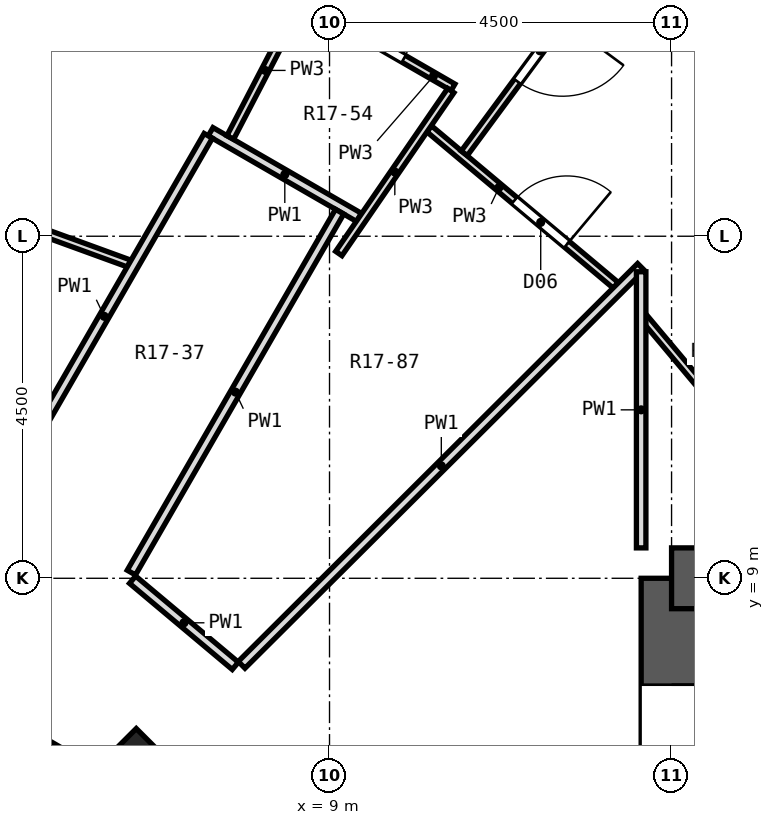
"""IFC4 building model, lengths in metres.
Left out: names, types, materials, properties, quantities, classifications, styles, units other than length and angle.
Written with IfcOpenShell. Run it as: python <this file> out.ifc"""

import sys

from ifc_helpers import new_model, si_unit, direction, frame, frame_2d, origin, origin_2d, place, context, subcontext, project, spatial, rectangle, extrude, element, fill, save


model = new_model("IFC4")
c1 = context("Model", 3, precision=1e-05, world=origin(), true_north=direction((0.0, 1.0)))
c2 = subcontext(c1, "Body", "Model", "MODEL_VIEW")
j1 = project(units=[si_unit("LENGTHUNIT", "METRE"), si_unit("PLANEANGLEUNIT", "RADIAN")], contexts=[c1])
p1 = place(None, origin())
s1 = spatial("IfcSite", under=j1, at=p1, CompositionType="ELEMENT")
p2 = place(p1, origin())
s2 = spatial("IfcBuilding", under=s1, at=p2, CompositionType="ELEMENT")
p3 = place(p2, frame((0.0, 0.0, 91.9)))
s3 = spatial("IfcBuildingStorey", under=s2, at=p3, CompositionType="ELEMENT", Elevation=91.9)
p4 = place(p3, frame((6.458, 6.458, 0.0), z_axis=(0.0, 0.0, 1.0), x_axis=(0.707106781187, 0.707106781187, 0.0)))
e1 = element("IfcColumn", 1, at=p4, inside=s3, PredefinedType="COLUMN", context=c2, shape_type="SweptSolid", body=[
    extrude(rectangle(XDim=0.8, YDim=0.8, at=origin_2d()), origin(), (0.0, 0.0, 1.0), 3.3),
])
p5 = place(p3, frame((13.5, -9.0, 0.0), z_axis=(0.0, 0.0, 1.0), x_axis=(0.0, 1.0, 0.0)))
e2 = element("IfcWall", 2, at=p5, inside=s3, PredefinedType="SHEAR", context=c2, shape_type="SweptSolid", body=[
    extrude(rectangle(XDim=18.0, YDim=0.8, at=frame_2d((9.0, 0.0))), origin(), (0.0, 0.0, 1.0), 3.3),
])
p6 = place(p5, frame((15.4, 0.0, 0.0)))
e3 = element("IfcOpeningElement", 3, at=p6, cuts=e2, PredefinedType="OPENING", context=c2, shape_type="SweptSolid", body=[
    extrude(rectangle(XDim=1.2, YDim=2.1, at=frame_2d((0.6, 1.05))), frame((0.0, 0.412, 0.0), z_axis=(0.0, -1.0, 0.0), x_axis=(1.0, 0.0, 0.0)), (0.0, 0.0, 1.0), 0.824),
])
p7 = place(p5, frame((1.4, 0.0, 0.0)))
e4 = element("IfcOpeningElement", 4, at=p7, cuts=e2, PredefinedType="OPENING", context=c2, shape_type="SweptSolid", body=[
    extrude(rectangle(XDim=1.2, YDim=2.1, at=frame_2d((0.6, 1.05))), frame((0.0, 0.412, 0.0), z_axis=(0.0, -1.0, 0.0), x_axis=(1.0, 0.0, 0.0)), (0.0, 0.0, 1.0), 0.824),
])
p8 = place(p5, frame((7.5, 0.0, 0.0)))
e5 = element("IfcOpeningElement", 5, at=p8, cuts=e2, PredefinedType="OPENING", context=c2, shape_type="SweptSolid", body=[
    extrude(rectangle(XDim=3.0, YDim=2.4, at=frame_2d((1.5, 1.2))), frame((0.0, 0.412, 0.0), z_axis=(0.0, -1.0, 0.0), x_axis=(1.0, 0.0, 0.0)), (0.0, 0.0, 1.0), 0.824),
])
p9 = place(p3, frame((13.5, 9.0, 0.0), z_axis=(0.0, 0.0, 1.0), x_axis=(1.0, 0.0, 0.0)))
e6 = element("IfcWall", 6, at=p9, inside=s3, PredefinedType="SHEAR", context=c2, shape_type="SweptSolid", body=[
    extrude(rectangle(XDim=10.4, YDim=0.8, at=frame_2d((5.2, 0.0))), origin(), (0.0, 0.0, 1.0), 3.3),
])
p10 = place(p3, frame((5.773, 6.251, 0.0), z_axis=(0.0, 0.0, 1.0), x_axis=(-0.86604563398, 0.499964958637, 0.0)))
e7 = element("IfcWall", 7, at=p10, inside=s3, PredefinedType="SOLIDWALL", context=c2, shape_type="SweptSolid", body=[
    extrude(rectangle(XDim=3.747, YDim=0.6, at=frame_2d((1.874, 0.0))), origin(), (0.0, 0.0, 1.0), 2.8),
])
p11 = place(p10, frame((0.674, 0.0, 0.9)))
e8 = element("IfcOpeningElement", 8, at=p11, cuts=e7, PredefinedType="OPENING", context=c2, shape_type="SweptSolid", body=[
    extrude(rectangle(XDim=2.4, YDim=1.8, at=frame_2d((1.2, 0.9))), frame((0.0, 0.312, 0.0), z_axis=(0.0, -1.0, 0.0), x_axis=(1.0, 0.0, 0.0)), (0.0, 0.0, 1.0), 0.624),
])
p12 = place(p3, frame((13.14, 12.425, 0.0), z_axis=(0.0, 0.0, 1.0), x_axis=(0.642692247105, -0.766124451712, 0.0)))
e9 = element("IfcWall", 9, at=p12, inside=s3, PredefinedType="PARTITIONING", context=c2, shape_type="SweptSolid", body=[
    extrude(rectangle(XDim=2.601, YDim=0.1, at=frame_2d((1.301, 0.0))), origin(), (0.0, 0.0, 1.0), 2.8),
])
p13 = place(p3, frame((6.409, 8.981, 0.0), z_axis=(0.0, 0.0, 1.0), x_axis=(0.766209131969, -0.642591290081, 0.0)))
e10 = element("IfcWall", 10, at=p13, inside=s3, PredefinedType="PARTITIONING", context=c2, shape_type="SweptSolid", body=[
    extrude(rectangle(XDim=1.764, YDim=0.125, at=frame_2d((0.882, 0.0))), origin(), (0.0, 0.0, 1.0), 2.8),
])
p14 = place(p3, frame((10.311, 14.914, 0.0), z_axis=(0.0, 0.0, 1.0), x_axis=(0.766187913062, -0.642616590104, 0.0)))
e11 = element("IfcWall", 11, at=p14, inside=s3, PredefinedType="PARTITIONING", context=c2, shape_type="SweptSolid", body=[
    extrude(rectangle(XDim=3.205, YDim=0.1, at=frame_2d((1.602, 0.0))), origin(), (0.0, 0.0, 1.0), 2.8),
])
p15 = place(p14, frame((1.466, 0.0, 0.0)))
e12 = element("IfcOpeningElement", 12, at=p15, cuts=e11, PredefinedType="OPENING", context=c2, shape_type="SweptSolid", body=[
    extrude(rectangle(XDim=0.9, YDim=2.1, at=frame_2d((0.45, 1.05))), frame((0.0, 0.062, 0.0), z_axis=(0.0, -1.0, 0.0), x_axis=(1.0, 0.0, 0.0)), (0.0, 0.0, 1.0), 0.124),
])
p16 = place(p3, frame((13.149, 17.03, 0.0), z_axis=(0.0, 0.0, 1.0), x_axis=(0.766003631775, -0.642836243617, 0.0)))
e13 = element("IfcWall", 13, at=p16, inside=s3, PredefinedType="PARTITIONING", context=c2, shape_type="SweptSolid", body=[
    extrude(rectangle(XDim=2.704, YDim=0.1, at=frame_2d((1.352, 0.0))), origin(), (0.0, 0.0, 1.0), 2.8),
])
p17 = place(p3, frame((7.436, 14.875, 0.0), z_axis=(0.0, 0.0, 1.0), x_axis=(0.866028691075, -0.499994306202, 0.0)))
e14 = element("IfcWall", 14, at=p17, inside=s3, PredefinedType="PARTITIONING", context=c2, shape_type="SweptSolid", body=[
    extrude(rectangle(XDim=2.254, YDim=0.125, at=frame_2d((1.127, 0.0))), origin(), (0.0, 0.0, 1.0), 2.8),
])
p18 = place(p3, frame((8.679, 16.582, 0.0), z_axis=(0.0, 0.0, 1.0), x_axis=(0.866122264928, -0.499832194037, 0.0)))
e15 = element("IfcWall", 15, at=p18, inside=s3, PredefinedType="PARTITIONING", context=c2, shape_type="SweptSolid", body=[
    extrude(rectangle(XDim=2.247, YDim=0.1, at=frame_2d((1.124, 0.0))), origin(), (0.0, 0.0, 1.0), 2.8),
])
p19 = place(p18, frame((0.698, 0.0, 0.0)))
e16 = element("IfcOpeningElement", 16, at=p19, cuts=e15, PredefinedType="OPENING", context=c2, shape_type="SweptSolid", body=[
    extrude(rectangle(XDim=0.8, YDim=2.1, at=frame_2d((0.4, 1.05))), frame((0.0, 0.062, 0.0), z_axis=(0.0, -1.0, 0.0), x_axis=(1.0, 0.0, 0.0)), (0.0, 0.0, 1.0), 0.124),
])
p20 = place(p3, frame((3.726, 14.101, 0.0), z_axis=(0.0, 0.0, 1.0), x_axis=(0.939597715072, -0.342280782152, 0.0)))
e17 = element("IfcWall", 17, at=p20, inside=s3, PredefinedType="PARTITIONING", context=c2, shape_type="SweptSolid", body=[
    extrude(rectangle(XDim=2.807, YDim=0.1, at=frame_2d((1.403, 0.0))), origin(), (0.0, 0.0, 1.0), 2.8),
])
p21 = place(p3, frame((7.844, 7.861, 0.0), z_axis=(0.0, 0.0, 1.0), x_axis=(0.708356490253, 0.705854859526, 0.0)))
e18 = element("IfcWall", 18, at=p21, inside=s3, PredefinedType="PARTITIONING", context=c2, shape_type="SweptSolid", body=[
    extrude(rectangle(XDim=7.417, YDim=0.125, at=frame_2d((3.708, 0.0))), origin(), (0.0, 0.0, 1.0), 2.8),
])
p22 = place(p3, frame((10.773, 14.591, 0.0), z_axis=(0.0, 0.0, 1.0), x_axis=(0.593899624956, 0.804539144776, 0.0)))
e19 = element("IfcWall", 19, at=p22, inside=s3, PredefinedType="PARTITIONING", context=c2, shape_type="SweptSolid", body=[
    extrude(rectangle(XDim=3.339, YDim=0.1, at=frame_2d((1.669, 0.0))), origin(), (0.0, 0.0, 1.0), 2.8),
])
p23 = place(p22, frame((1.176, 0.0, 0.0)))
e20 = element("IfcOpeningElement", 20, at=p23, cuts=e19, PredefinedType="OPENING", context=c2, shape_type="SweptSolid", body=[
    extrude(rectangle(XDim=1.0, YDim=2.1, at=frame_2d((0.5, 1.05))), frame((0.0, 0.062, 0.0), z_axis=(0.0, -1.0, 0.0), x_axis=(1.0, 0.0, 0.0)), (0.0, 0.0, 1.0), 0.124),
])
p24 = place(p3, frame((9.122, 13.272, 0.0), z_axis=(0.0, 0.0, 1.0), x_axis=(0.566405338298, 0.82412680623, 0.0)))
e21 = element("IfcWall", 21, at=p24, inside=s3, PredefinedType="PARTITIONING", context=c2, shape_type="SweptSolid", body=[
    extrude(rectangle(XDim=2.601, YDim=0.1, at=frame_2d((1.301, 0.0))), origin(), (0.0, 0.0, 1.0), 2.8),
])
p25 = place(p3, frame((6.393, 9.075, 0.0), z_axis=(0.0, 0.0, 1.0), x_axis=(0.499717313028, 0.866188551679, 0.0)))
e22 = element("IfcWall", 22, at=p25, inside=s3, PredefinedType="PARTITIONING", context=c2, shape_type="SweptSolid", body=[
    extrude(rectangle(XDim=5.482, YDim=0.125, at=frame_2d((2.741, 0.0))), origin(), (0.0, 0.0, 1.0), 2.8),
])
p26 = place(p3, frame((4.666, 10.072, 0.0), z_axis=(0.0, 0.0, 1.0), x_axis=(0.499564368271, 0.866276769834, 0.0)))
e23 = element("IfcWall", 23, at=p26, inside=s3, PredefinedType="PARTITIONING", context=c2, shape_type="SweptSolid", body=[
    extrude(rectangle(XDim=5.482, YDim=0.125, at=frame_2d((2.741, 0.0))), origin(), (0.0, 0.0, 1.0), 2.8),
])
p27 = place(p3, frame((7.694, 14.8, 0.0), z_axis=(0.0, 0.0, 1.0), x_axis=(0.461012435149, 0.887393675117, 0.0)))
e24 = element("IfcWall", 24, at=p27, inside=s3, PredefinedType="PARTITIONING", context=c2, shape_type="SweptSolid", body=[
    extrude(rectangle(XDim=1.988, YDim=0.1, at=frame_2d((0.994, 0.0))), origin(), (0.0, 0.0, 1.0), 2.8),
])
p28 = place(p3, frame((13.1, 9.4, 0.0), z_axis=(0.0, 0.0, 1.0), x_axis=(0.0, 1.0, 0.0)))
e25 = element("IfcWall", 25, at=p28, inside=s3, PredefinedType="PARTITIONING", context=c2, shape_type="SweptSolid", body=[
    extrude(rectangle(XDim=3.633, YDim=0.125, at=frame_2d((1.816, 0.0))), origin(), (0.0, 0.0, 1.0), 2.8),
])
p29 = place(p15, origin())
e26 = element("IfcDoor", 26, at=p29, inside=s3, OperationType="SINGLE_SWING_RIGHT", PredefinedType="DOOR", context=c2, shape_type="SweptSolid", body=[
    extrude(rectangle(XDim=0.9, YDim=2.1, at=frame_2d((0.45, 1.05))), frame((0.0, 0.025, 0.0), z_axis=(0.0, -1.0, 0.0), x_axis=(1.0, 0.0, 0.0)), (0.0, 0.0, 1.0), 0.05),
])
fill(e12, e26)
p30 = place(p23, frame((1.0, 0.0, 0.0), z_axis=(0.0, 0.0, 1.0), x_axis=(-1.0, 0.0, 0.0)))
e27 = element("IfcDoor", 27, at=p30, inside=s3, OperationType="SINGLE_SWING_LEFT", PredefinedType="DOOR", context=c2, shape_type="SweptSolid", body=[
    extrude(rectangle(XDim=1.0, YDim=2.1, at=frame_2d((0.5, 1.05))), frame((0.0, 0.025, 0.0), z_axis=(0.0, -1.0, 0.0), x_axis=(1.0, 0.0, 0.0)), (0.0, 0.0, 1.0), 0.05),
])
fill(e20, e27)
p31 = place(p19, origin())
e28 = element("IfcDoor", 28, at=p31, inside=s3, OperationType="SINGLE_SWING_LEFT", PredefinedType="DOOR", context=c2, shape_type="SweptSolid", body=[
    extrude(rectangle(XDim=0.8, YDim=2.1, at=frame_2d((0.4, 1.05))), frame((0.0, 0.025, 0.0), z_axis=(0.0, -1.0, 0.0), x_axis=(1.0, 0.0, 0.0)), (0.0, 0.0, 1.0), 0.05),
])
fill(e16, e28)
p32 = place(p6, frame((1.2, 0.0, 0.0), z_axis=(0.0, 0.0, 1.0), x_axis=(-1.0, 0.0, 0.0)))
e29 = element("IfcDoor", 29, at=p32, inside=s3, OperationType="SINGLE_SWING_LEFT", PredefinedType="DOOR", context=c2, shape_type="SweptSolid", body=[
    extrude(rectangle(XDim=1.2, YDim=2.1, at=frame_2d((0.6, 1.05))), frame((0.0, 0.025, 0.0), z_axis=(0.0, -1.0, 0.0), x_axis=(1.0, 0.0, 0.0)), (0.0, 0.0, 1.0), 0.05),
])
fill(e3, e29)
save(model, sys.argv[1])
